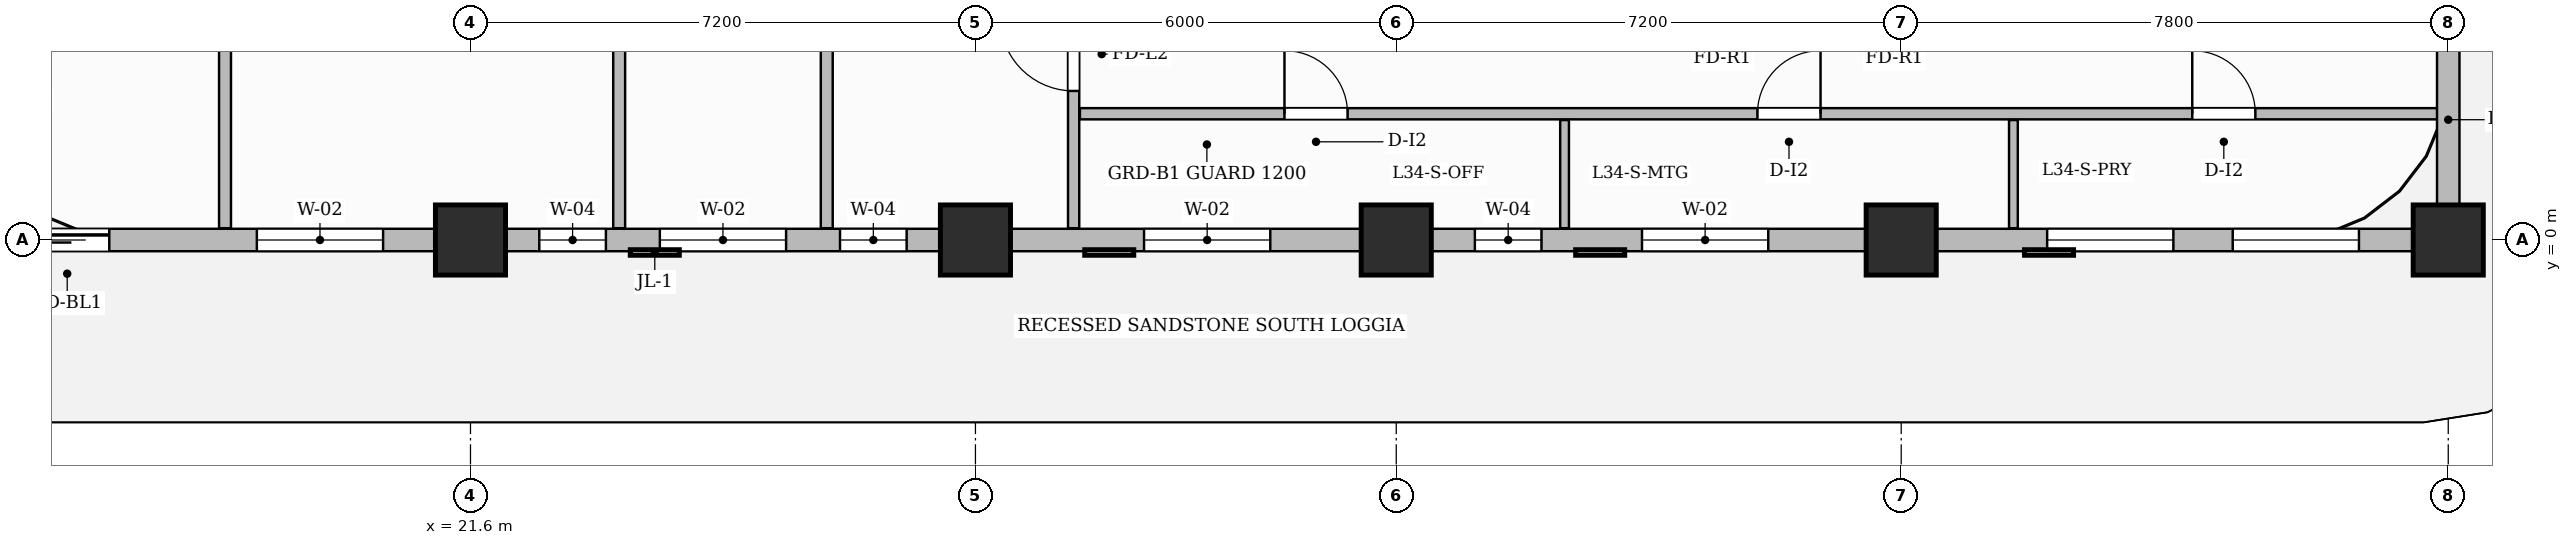
"""IFC4 building model, lengths in metres.
Left out: names, types, materials, properties, quantities, classifications, styles, units other than length and angle.
Written with IfcOpenShell. Run it as: python <this file> out.ifc"""

import sys

from ifc_helpers import new_model, si_unit, direction, frame, frame_2d, origin, origin_2d, place, context, subcontext, project, spatial, rectangle, extrude, source, transform, mapped, element, fill, save


model = new_model("IFC4")
c1 = context("Model", 3, precision=1e-05, world=origin(), true_north=direction((0.0, 1.0)))
c2 = subcontext(c1, "Body", "Model", "MODEL_VIEW")
j1 = project(units=[si_unit("LENGTHUNIT", "METRE"), si_unit("PLANEANGLEUNIT", "RADIAN")], contexts=[c1])
p1 = place(None, origin())
s1 = spatial("IfcSite", under=j1, at=p1, CompositionType="ELEMENT")
p2 = place(p1, origin())
s2 = spatial("IfcBuilding", under=s1, at=p2, CompositionType="ELEMENT")
p3 = place(p2, frame((0.0, 0.0, 137.7)))
s3 = spatial("IfcBuildingStorey", under=s2, at=p3, CompositionType="ELEMENT", Elevation=137.7)
m1 = source(origin(), c2, "Body", "SweptSolid", [
    extrude(rectangle(XDim=1.0, YDim=1.0, at=origin_2d()), origin(), (0.0, 0.0, 1.0), 3.7),
])
for number, where, z_axis, x_axis in (
    (1, (21.6, 0.0, 0.0), (0.0, 0.0, 1.0), (1.0, 0.0, 0.0)),
    (2, (28.8, 0.0, 0.0), (0.0, 0.0, 1.0), (1.0, 0.0, 0.0)),
    (3, (34.8, 0.0, 0.0), (0.0, 0.0, 1.0), (1.0, 0.0, 0.0)),
    (4, (42.0, 0.0, 0.0), (0.0, 0.0, 1.0), (1.0, 0.0, 0.0)),
    (5, (49.8, 0.0, 0.0), (0.0, 0.0, 1.0), (1.0, 0.0, 0.0)),
):
    element("IfcColumn", number, at=place(p3, frame(where, z_axis=z_axis, x_axis=x_axis)), inside=s3, PredefinedType="COLUMN", context=c2, shape_type="MappedRepresentation", body=[
        mapped(m1, transform((0.0, 0.0, 0.0), scale=1.0)),
    ])
p4 = place(p3, frame((30.2, 0.168, 0.0), z_axis=(0.0, 0.0, 1.0), x_axis=(0.0, 1.0, 0.0)))
e6 = element("IfcWall", 6, at=p4, inside=s3, PredefinedType="PARTITIONING", context=c2, shape_type="SweptSolid", body=[
    extrude(rectangle(XDim=9.892, YDim=0.16, at=frame_2d((4.946, 0.0))), origin(), (0.0, 0.0, 1.0), 3.45),
])
p5 = place(p4, frame((1.957, 0.0, 0.0)))
e7 = element("IfcOpeningElement", 7, at=p5, cuts=e6, PredefinedType="OPENING", context=c2, shape_type="SweptSolid", body=[
    extrude(rectangle(XDim=1.05, YDim=2.15, at=frame_2d((0.525, 1.075))), frame((0.0, 0.09, 0.0), z_axis=(0.0, -1.0, 0.0), x_axis=(1.0, 0.0, 0.0)), (0.0, 0.0, 1.0), 0.18),
])
p6 = place(p3, frame((30.29, 1.8, 0.0), z_axis=(0.0, 0.0, 1.0), x_axis=(1.0, 0.0, 0.0)))
e8 = element("IfcWall", 8, at=p6, inside=s3, PredefinedType="PARTITIONING", context=c2, shape_type="SweptSolid", body=[
    extrude(rectangle(XDim=19.37, YDim=0.16, at=frame_2d((9.685, 0.0))), origin(), (0.0, 0.0, 1.0), 3.45),
])
p7 = place(p6, frame((2.916, 0.0, 0.0)))
e9 = element("IfcOpeningElement", 9, at=p7, cuts=e8, PredefinedType="OPENING", context=c2, shape_type="SweptSolid", body=[
    extrude(rectangle(XDim=0.9, YDim=2.15, at=frame_2d((0.45, 1.075))), frame((0.0, 0.09, 0.0), z_axis=(0.0, -1.0, 0.0), x_axis=(1.0, 0.0, 0.0)), (0.0, 0.0, 1.0), 0.18),
])
p8 = place(p6, frame((9.66, 0.0, 0.0)))
e10 = element("IfcOpeningElement", 10, at=p8, cuts=e8, PredefinedType="OPENING", context=c2, shape_type="SweptSolid", body=[
    extrude(rectangle(XDim=0.9, YDim=2.15, at=frame_2d((0.45, 1.075))), frame((0.0, 0.09, 0.0), z_axis=(0.0, -1.0, 0.0), x_axis=(1.0, 0.0, 0.0)), (0.0, 0.0, 1.0), 0.18),
])
p9 = place(p6, frame((15.86, 0.0, 0.0)))
e11 = element("IfcOpeningElement", 11, at=p9, cuts=e8, PredefinedType="OPENING", context=c2, shape_type="SweptSolid", body=[
    extrude(rectangle(XDim=0.9, YDim=2.15, at=frame_2d((0.45, 1.075))), frame((0.0, 0.09, 0.0), z_axis=(0.0, -1.0, 0.0), x_axis=(1.0, 0.0, 0.0)), (0.0, 0.0, 1.0), 0.18),
])
for number, where, z_axis, x_axis in (
    (12, (37.2, 0.168, 0.0), (0.0, 0.0, 1.0), (0.0, 1.0, 0.0)),
    (13, (43.6, 0.168, 0.0), (0.0, 0.0, 1.0), (0.0, 1.0, 0.0)),
):
    element("IfcWall", number, at=place(p3, frame(where, z_axis=z_axis, x_axis=x_axis)), inside=s3, PredefinedType="PARTITIONING", context=c2, shape_type="SweptSolid", body=[
        extrude(rectangle(XDim=1.542, YDim=0.125, at=frame_2d((0.771, 0.0))), origin(), (0.0, 0.0, 1.0), 3.45),
    ])
p10 = place(p3, frame((18.1, 0.168, 0.0), z_axis=(0.0, 0.0, 1.0), x_axis=(0.0, 1.0, 0.0)))
e14 = element("IfcWall", 14, at=p10, inside=s3, PredefinedType="PARTITIONING", context=c2, shape_type="SweptSolid", body=[
    extrude(rectangle(XDim=9.892, YDim=0.17, at=frame_2d((4.946, 0.0))), origin(), (0.0, 0.0, 1.0), 3.105),
])
for number, where, z_axis, x_axis in (
    (15, (23.72, 0.168, 0.0), (0.0, 0.0, 1.0), (0.0, 1.0, 0.0)),
    (16, (26.68, 0.168, 0.0), (0.0, 0.0, 1.0), (0.0, 1.0, 0.0)),
):
    element("IfcWall", number, at=place(p3, frame(where, z_axis=z_axis, x_axis=x_axis)), inside=s3, PredefinedType="PARTITIONING", context=c2, shape_type="SweptSolid", body=[
        extrude(rectangle(XDim=9.892, YDim=0.17, at=frame_2d((4.946, 0.0))), origin(), (0.0, 0.0, 1.0), 3.45),
    ])
p11 = place(p3, frame((14.4, 0.0, 0.0), z_axis=(0.0, 0.0, 1.0), x_axis=(1.0, 0.0, 0.0)))
e17 = element("IfcWall", 17, at=p11, inside=s3, PredefinedType="SOLIDWALL", context=c2, shape_type="SweptSolid", body=[
    extrude(rectangle(XDim=35.4, YDim=0.32, at=frame_2d((17.7, 0.0))), origin(), (0.0, 0.0, 1.0), 2.935),
])
p12 = place(p11, frame((0.85, 0.0, 0.0)))
e18 = element("IfcOpeningElement", 18, at=p12, cuts=e17, PredefinedType="OPENING", context=c2, shape_type="SweptSolid", body=[
    extrude(rectangle(XDim=1.2, YDim=2.2, at=frame_2d((0.6, 1.1))), frame((0.0, 0.17, 0.0), z_axis=(0.0, -1.0, 0.0), x_axis=(1.0, 0.0, 0.0)), (0.0, 0.0, 1.0), 0.34),
])
p13 = place(p11, frame((4.154, 0.0, 0.8)))
e19 = element("IfcOpeningElement", 19, at=p13, cuts=e17, PredefinedType="OPENING", context=c2, shape_type="SweptSolid", body=[
    extrude(rectangle(XDim=1.8, YDim=1.85, at=frame_2d((0.9, 0.925))), frame((0.0, 0.17, 0.0), z_axis=(0.0, -1.0, 0.0), x_axis=(1.0, 0.0, 0.0)), (0.0, 0.0, 1.0), 0.34),
])
p14 = place(p11, frame((8.181, 0.0, 0.8)))
e20 = element("IfcOpeningElement", 20, at=p14, cuts=e17, PredefinedType="OPENING", context=c2, shape_type="SweptSolid", body=[
    extrude(rectangle(XDim=0.95, YDim=1.75, at=frame_2d((0.475, 0.875))), frame((0.0, 0.17, 0.0), z_axis=(0.0, -1.0, 0.0), x_axis=(1.0, 0.0, 0.0)), (0.0, 0.0, 1.0), 0.34),
])
p15 = place(p11, frame((9.9, 0.0, 0.8)))
e21 = element("IfcOpeningElement", 21, at=p15, cuts=e17, PredefinedType="OPENING", context=c2, shape_type="SweptSolid", body=[
    extrude(rectangle(XDim=1.8, YDim=1.85, at=frame_2d((0.9, 0.925))), frame((0.0, 0.17, 0.0), z_axis=(0.0, -1.0, 0.0), x_axis=(1.0, 0.0, 0.0)), (0.0, 0.0, 1.0), 0.34),
])
p16 = place(p11, frame((12.469, 0.0, 0.8)))
e22 = element("IfcOpeningElement", 22, at=p16, cuts=e17, PredefinedType="OPENING", context=c2, shape_type="SweptSolid", body=[
    extrude(rectangle(XDim=0.95, YDim=1.75, at=frame_2d((0.475, 0.875))), frame((0.0, 0.17, 0.0), z_axis=(0.0, -1.0, 0.0), x_axis=(1.0, 0.0, 0.0)), (0.0, 0.0, 1.0), 0.34),
])
p17 = place(p11, frame((16.804, 0.0, 0.8)))
e23 = element("IfcOpeningElement", 23, at=p17, cuts=e17, PredefinedType="OPENING", context=c2, shape_type="SweptSolid", body=[
    extrude(rectangle(XDim=1.8, YDim=1.85, at=frame_2d((0.9, 0.925))), frame((0.0, 0.17, 0.0), z_axis=(0.0, -1.0, 0.0), x_axis=(1.0, 0.0, 0.0)), (0.0, 0.0, 1.0), 0.34),
])
p18 = place(p11, frame((21.521, 0.0, 0.8)))
e24 = element("IfcOpeningElement", 24, at=p18, cuts=e17, PredefinedType="OPENING", context=c2, shape_type="SweptSolid", body=[
    extrude(rectangle(XDim=0.95, YDim=1.75, at=frame_2d((0.475, 0.875))), frame((0.0, 0.17, 0.0), z_axis=(0.0, -1.0, 0.0), x_axis=(1.0, 0.0, 0.0)), (0.0, 0.0, 1.0), 0.34),
])
p19 = place(p11, frame((23.904, 0.0, 0.8)))
e25 = element("IfcOpeningElement", 25, at=p19, cuts=e17, PredefinedType="OPENING", context=c2, shape_type="SweptSolid", body=[
    extrude(rectangle(XDim=1.8, YDim=1.85, at=frame_2d((0.9, 0.925))), frame((0.0, 0.17, 0.0), z_axis=(0.0, -1.0, 0.0), x_axis=(1.0, 0.0, 0.0)), (0.0, 0.0, 1.0), 0.34),
])
p20 = place(p11, frame((29.681, 0.0, 0.8)))
e26 = element("IfcOpeningElement", 26, at=p20, cuts=e17, PredefinedType="OPENING", context=c2, shape_type="SweptSolid", body=[
    extrude(rectangle(XDim=1.8, YDim=1.85, at=frame_2d((0.9, 0.925))), frame((0.0, 0.17, 0.0), z_axis=(0.0, -1.0, 0.0), x_axis=(1.0, 0.0, 0.0)), (0.0, 0.0, 1.0), 0.34),
])
p21 = place(p11, frame((32.327, 0.0, 0.8)))
e27 = element("IfcOpeningElement", 27, at=p21, cuts=e17, PredefinedType="OPENING", context=c2, shape_type="SweptSolid", body=[
    extrude(rectangle(XDim=1.8, YDim=1.85, at=frame_2d((0.9, 0.925))), frame((0.0, 0.17, 0.0), z_axis=(0.0, -1.0, 0.0), x_axis=(1.0, 0.0, 0.0)), (0.0, 0.0, 1.0), 0.34),
])
p22 = place(p3, frame((49.8, 0.05, 0.0), z_axis=(0.0, 0.0, 1.0), x_axis=(0.0, 1.0, 0.0)))
e28 = element("IfcWall", 28, at=p22, inside=s3, PredefinedType="SOLIDWALL", context=c2, shape_type="SweptSolid", body=[
    extrude(rectangle(XDim=3.33, YDim=0.32, at=frame_2d((1.665, 0.0))), origin(), (0.0, 0.0, 1.0), 3.45),
])
m2 = source(origin(), c2, "Body", "SweptSolid", [
    extrude(rectangle(XDim=1.05, YDim=2.15, at=frame_2d((0.525, 1.075))), frame((0.0, 0.025, 0.0), z_axis=(0.0, -1.0, 0.0), x_axis=(1.0, 0.0, 0.0)), (0.0, 0.0, 1.0), 0.05),
])
p23 = place(p5, origin())
e29 = element("IfcDoor", 29, at=p23, inside=s3, OperationType="SINGLE_SWING_RIGHT", PredefinedType="DOOR", context=c2, shape_type="MappedRepresentation", body=[
    mapped(m2, transform((0.0, 0.0, 0.0), scale=1.0)),
])
fill(e7, e29)
m3 = source(origin(), c2, "Body", "SweptSolid", [
    extrude(rectangle(XDim=0.9, YDim=2.15, at=frame_2d((0.45, 1.075))), frame((0.0, 0.025, 0.0), z_axis=(0.0, -1.0, 0.0), x_axis=(1.0, 0.0, 0.0)), (0.0, 0.0, 1.0), 0.05),
])
p24 = place(p7, origin())
e30 = element("IfcDoor", 30, at=p24, inside=s3, OperationType="SINGLE_SWING_LEFT", PredefinedType="DOOR", context=c2, shape_type="MappedRepresentation", body=[
    mapped(m3, transform((0.0, 0.0, 0.0), scale=1.0)),
])
fill(e9, e30)
p25 = place(p8, origin())
e31 = element("IfcDoor", 31, at=p25, inside=s3, OperationType="SINGLE_SWING_RIGHT", PredefinedType="DOOR", context=c2, shape_type="MappedRepresentation", body=[
    mapped(m3, transform((0.0, 0.0, 0.0), scale=1.0)),
])
fill(e10, e31)
p26 = place(p9, origin())
e32 = element("IfcDoor", 32, at=p26, inside=s3, OperationType="SINGLE_SWING_LEFT", PredefinedType="DOOR", context=c2, shape_type="MappedRepresentation", body=[
    mapped(m3, transform((0.0, 0.0, 0.0), scale=1.0)),
])
fill(e11, e32)
m4 = source(origin(), c2, "Body", "SweptSolid", [
    extrude(rectangle(XDim=1.2, YDim=2.2, at=frame_2d((0.6, 1.1))), frame((0.0, 0.025, 0.0), z_axis=(0.0, -1.0, 0.0), x_axis=(1.0, 0.0, 0.0)), (0.0, 0.0, 1.0), 0.05),
])
p27 = place(p12, origin())
e33 = element("IfcDoor", 33, at=p27, inside=s3, OperationType="SLIDING_TO_LEFT", PredefinedType="DOOR", context=c2, shape_type="MappedRepresentation", body=[
    mapped(m4, transform((0.0, 0.0, 0.0), scale=1.0)),
])
fill(e18, e33)
m5 = source(origin(), c2, "Body", "SweptSolid", [
    extrude(rectangle(XDim=1.8, YDim=1.85, at=frame_2d((0.9, 0.925))), frame((0.0, 0.03, 0.0), z_axis=(0.0, -1.0, 0.0), x_axis=(1.0, 0.0, 0.0)), (0.0, 0.0, 1.0), 0.06),
])
p28 = place(p13, origin())
e34 = element("IfcWindow", 34, at=p28, inside=s3, PartitioningType="DOUBLE_PANEL_VERTICAL", PredefinedType="WINDOW", context=c2, shape_type="MappedRepresentation", body=[
    mapped(m5, transform((0.0, 0.0, 0.0), scale=1.0)),
])
fill(e19, e34)
m6 = source(origin(), c2, "Body", "SweptSolid", [
    extrude(rectangle(XDim=0.95, YDim=1.75, at=frame_2d((0.475, 0.875))), frame((0.0, 0.03, 0.0), z_axis=(0.0, -1.0, 0.0), x_axis=(1.0, 0.0, 0.0)), (0.0, 0.0, 1.0), 0.06),
])
p29 = place(p14, origin())
e35 = element("IfcWindow", 35, at=p29, inside=s3, PartitioningType="SINGLE_PANEL", PredefinedType="WINDOW", context=c2, shape_type="MappedRepresentation", body=[
    mapped(m6, transform((0.0, 0.0, 0.0), scale=1.0)),
])
fill(e20, e35)
p30 = place(p15, origin())
e36 = element("IfcWindow", 36, at=p30, inside=s3, PartitioningType="DOUBLE_PANEL_VERTICAL", PredefinedType="WINDOW", context=c2, shape_type="MappedRepresentation", body=[
    mapped(m5, transform((0.0, 0.0, 0.0), scale=1.0)),
])
fill(e21, e36)
p31 = place(p16, origin())
e37 = element("IfcWindow", 37, at=p31, inside=s3, PartitioningType="SINGLE_PANEL", PredefinedType="WINDOW", context=c2, shape_type="MappedRepresentation", body=[
    mapped(m6, transform((0.0, 0.0, 0.0), scale=1.0)),
])
fill(e22, e37)
p32 = place(p17, origin())
e38 = element("IfcWindow", 38, at=p32, inside=s3, PartitioningType="DOUBLE_PANEL_VERTICAL", PredefinedType="WINDOW", context=c2, shape_type="MappedRepresentation", body=[
    mapped(m5, transform((0.0, 0.0, 0.0), scale=1.0)),
])
fill(e23, e38)
p33 = place(p18, origin())
e39 = element("IfcWindow", 39, at=p33, inside=s3, PartitioningType="SINGLE_PANEL", PredefinedType="WINDOW", context=c2, shape_type="MappedRepresentation", body=[
    mapped(m6, transform((0.0, 0.0, 0.0), scale=1.0)),
])
fill(e24, e39)
p34 = place(p19, origin())
e40 = element("IfcWindow", 40, at=p34, inside=s3, PartitioningType="DOUBLE_PANEL_VERTICAL", PredefinedType="WINDOW", context=c2, shape_type="MappedRepresentation", body=[
    mapped(m5, transform((0.0, 0.0, 0.0), scale=1.0)),
])
fill(e25, e40)
p35 = place(p20, origin())
e41 = element("IfcWindow", 41, at=p35, inside=s3, PartitioningType="DOUBLE_PANEL_VERTICAL", PredefinedType="WINDOW", context=c2, shape_type="MappedRepresentation", body=[
    mapped(m5, transform((0.0, 0.0, 0.0), scale=1.0)),
])
fill(e26, e41)
p36 = place(p21, origin())
e42 = element("IfcWindow", 42, at=p36, inside=s3, PartitioningType="DOUBLE_PANEL_VERTICAL", PredefinedType="WINDOW", context=c2, shape_type="MappedRepresentation", body=[
    mapped(m5, transform((0.0, 0.0, 0.0), scale=1.0)),
])
fill(e27, e42)
save(model, sys.argv[1])
